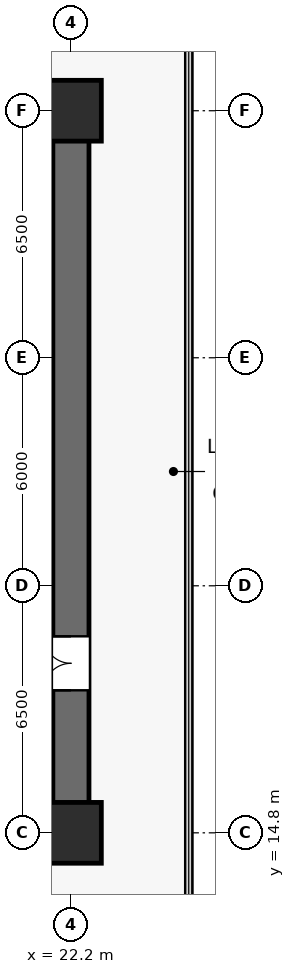
"""IFC4 building model, lengths in metres.
Left out: names, types, materials, properties, quantities, classifications, styles, units other than length and angle.
Written with IfcOpenShell. Run it as: python <this file> out.ifc"""

import sys

from ifc_helpers import new_model, si_unit, direction, frame, frame_2d, origin, origin_2d, place, context, subcontext, project, spatial, rectangle, extrude, source, transform, mapped, element, fill, save


model = new_model("IFC4")
c1 = context("Model", 3, precision=1e-05, world=origin(), true_north=direction((0.0, 1.0)))
c2 = subcontext(c1, "Body", "Model", "MODEL_VIEW")
j1 = project(units=[si_unit("LENGTHUNIT", "METRE"), si_unit("PLANEANGLEUNIT", "RADIAN")], contexts=[c1])
p1 = place(None, origin())
s1 = spatial("IfcSite", under=j1, at=p1, CompositionType="ELEMENT")
p2 = place(p1, origin())
s2 = spatial("IfcBuilding", under=s1, at=p2, CompositionType="ELEMENT")
p3 = place(p2, frame((0.0, 0.0, 15.0)))
s3 = spatial("IfcBuildingStorey", under=s2, at=p3, CompositionType="ELEMENT", Elevation=15.0)
p4 = place(p3, frame((6.925, 14.8, 0.0), z_axis=(0.0, 0.0, 1.0), x_axis=(1.0, 0.0, 0.0)))
e1 = element("IfcWall", 1, at=p4, inside=s3, PredefinedType="SHEAR", context=c2, shape_type="SweptSolid", body=[
    extrude(rectangle(XDim=15.75, YDim=0.95, at=frame_2d((7.875, 0.0))), origin(), (0.0, 0.0, 1.0), 4.45),
])
p5 = place(p3, frame((6.925, 33.8, 0.0), z_axis=(0.0, 0.0, 1.0), x_axis=(1.0, 0.0, 0.0)))
e2 = element("IfcWall", 2, at=p5, inside=s3, PredefinedType="SHEAR", context=c2, shape_type="SweptSolid", body=[
    extrude(rectangle(XDim=15.75, YDim=0.95, at=frame_2d((7.875, 0.0))), origin(), (0.0, 0.0, 1.0), 4.45),
])
p6 = place(p5, frame((5.4, 0.0, 0.0)))
e3 = element("IfcOpeningElement", 3, at=p6, cuts=e2, PredefinedType="OPENING", context=c2, shape_type="SweptSolid", body=[
    extrude(rectangle(XDim=0.95, YDim=2.15, at=frame_2d((0.475, 1.075))), frame((0.0, 0.485, 0.0), z_axis=(0.0, -1.0, 0.0), x_axis=(1.0, 0.0, 0.0)), (0.0, 0.0, 1.0), 0.97),
])
p7 = place(p5, frame((7.915, 0.0, 0.0)))
e4 = element("IfcOpeningElement", 4, at=p7, cuts=e2, PredefinedType="OPENING", context=c2, shape_type="SweptSolid", body=[
    extrude(rectangle(XDim=0.95, YDim=2.15, at=frame_2d((0.475, 1.075))), frame((0.0, 0.485, 0.0), z_axis=(0.0, -1.0, 0.0), x_axis=(1.0, 0.0, 0.0)), (0.0, 0.0, 1.0), 0.97),
])
p8 = place(p5, frame((10.465, 0.0, 0.0)))
e5 = element("IfcOpeningElement", 5, at=p8, cuts=e2, PredefinedType="OPENING", context=c2, shape_type="SweptSolid", body=[
    extrude(rectangle(XDim=0.95, YDim=2.15, at=frame_2d((0.475, 1.075))), frame((0.0, 0.485, 0.0), z_axis=(0.0, -1.0, 0.0), x_axis=(1.0, 0.0, 0.0)), (0.0, 0.0, 1.0), 0.97),
])
p9 = place(p5, frame((13.015, 0.0, 0.0)))
e6 = element("IfcOpeningElement", 6, at=p9, cuts=e2, PredefinedType="OPENING", context=c2, shape_type="SweptSolid", body=[
    extrude(rectangle(XDim=0.95, YDim=2.15, at=frame_2d((0.475, 1.075))), frame((0.0, 0.485, 0.0), z_axis=(0.0, -1.0, 0.0), x_axis=(1.0, 0.0, 0.0)), (0.0, 0.0, 1.0), 0.97),
])
p10 = place(p3, frame((22.2, 15.275, 0.0), z_axis=(0.0, 0.0, 1.0), x_axis=(0.0, 1.0, 0.0)))
e7 = element("IfcWall", 7, at=p10, inside=s3, PredefinedType="SHEAR", context=c2, shape_type="SweptSolid", body=[
    extrude(rectangle(XDim=18.05, YDim=0.95, at=frame_2d((9.025, 0.0))), origin(), (0.0, 0.0, 1.0), 4.45),
])
p11 = place(p10, frame((3.275, 0.0, 0.0)))
e8 = element("IfcOpeningElement", 8, at=p11, cuts=e7, PredefinedType="OPENING", context=c2, shape_type="SweptSolid", body=[
    extrude(rectangle(XDim=1.42, YDim=2.2, at=frame_2d((0.71, 1.1))), frame((0.0, 0.485, 0.0), z_axis=(0.0, -1.0, 0.0), x_axis=(1.0, 0.0, 0.0)), (0.0, 0.0, 1.0), 0.97),
])
m1 = source(origin(), c2, "Body", "SweptSolid", [
    extrude(rectangle(XDim=1.6, YDim=1.6, at=origin_2d()), origin(), (0.0, 0.0, 1.0), 4.8),
])
for number, where, z_axis, x_axis in (
    (9, (22.2, 14.8, 0.0), (0.0, 0.0, 1.0), (1.0, 0.0, 0.0)),
    (10, (22.2, 33.8, 0.0), (0.0, 0.0, 1.0), (1.0, 0.0, 0.0)),
):
    element("IfcColumn", number, at=place(p3, frame(where, z_axis=z_axis, x_axis=x_axis)), inside=s3, PredefinedType="COLUMN", context=c2, shape_type="MappedRepresentation", body=[
        mapped(m1, transform((0.0, 0.0, 0.0), scale=1.0)),
    ])
m2 = source(origin(), c2, "Body", "SweptSolid", [
    extrude(rectangle(XDim=1.42, YDim=2.2, at=frame_2d((0.71, 1.1))), frame((0.0, 0.025, 0.0), z_axis=(0.0, -1.0, 0.0), x_axis=(1.0, 0.0, 0.0)), (0.0, 0.0, 1.0), 0.05),
])
p12 = place(p11, origin())
e11 = element("IfcDoor", 11, at=p12, inside=s3, OperationType="DOUBLE_DOOR_SINGLE_SWING", PredefinedType="DOOR", context=c2, shape_type="MappedRepresentation", body=[
    mapped(m2, transform((0.0, 0.0, 0.0), scale=1.0)),
])
fill(e8, e11)
save(model, sys.argv[1])
